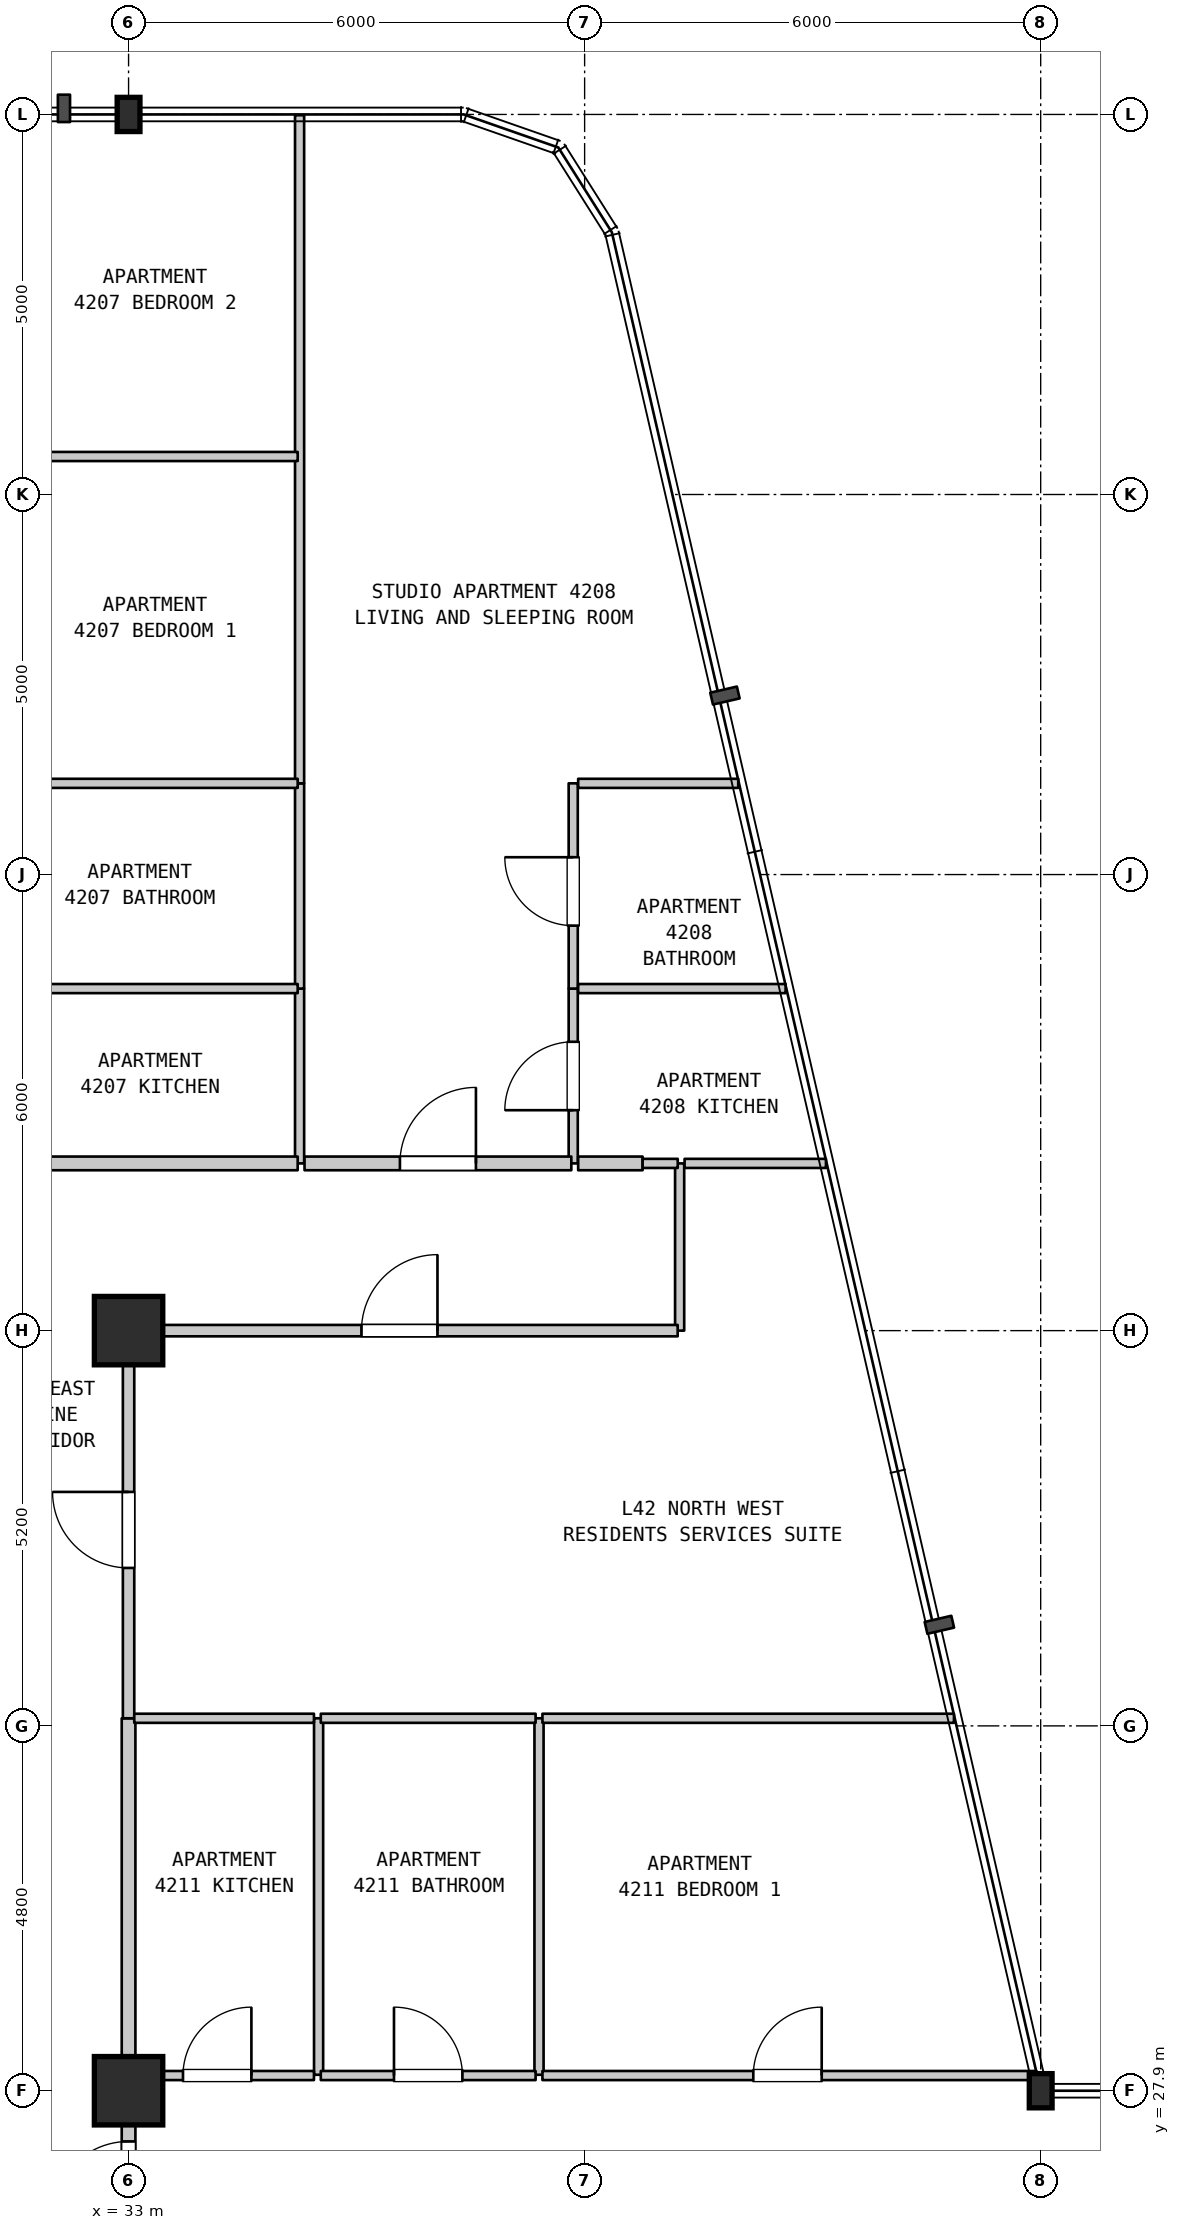
"""IFC4 building model, lengths in metres.
Left out: names, types, materials, properties, quantities, classifications, styles, units other than length and angle.
Written with IfcOpenShell. Run it as: python <this file> out.ifc"""

import sys

from ifc_helpers import new_model, si_unit, direction, frame, frame_2d, origin, origin_2d, place, context, subcontext, project, spatial, rectangle, i_section, extrude, element, fill, save


model = new_model("IFC4")
c1 = context("Model", 3, precision=1e-05, world=origin(), true_north=direction((0.0, 1.0)))
c2 = subcontext(c1, "Body", "Model", "MODEL_VIEW")
j1 = project(units=[si_unit("LENGTHUNIT", "METRE"), si_unit("PLANEANGLEUNIT", "RADIAN")], contexts=[c1])
p1 = place(None, origin())
s1 = spatial("IfcSite", under=j1, at=p1, CompositionType="ELEMENT")
p2 = place(p1, origin())
s2 = spatial("IfcBuilding", under=s1, at=p2, CompositionType="ELEMENT")
p3 = place(p2, frame((0.0, 0.0, 172.8)))
s3 = spatial("IfcBuildingStorey", under=s2, at=p3, CompositionType="ELEMENT", Elevation=172.8)
for number, where, z_axis, x_axis in (
    (1, (33.0, 27.9, 0.0), (0.0, 0.0, 1.0), (1.0, 0.0, 0.0)),
    (2, (33.0, 37.9, 0.0), (0.0, 0.0, 1.0), (1.0, 0.0, 0.0)),
):
    element("IfcColumn", number, at=place(p3, frame(where, z_axis=z_axis, x_axis=x_axis)), inside=s3, PredefinedType="COLUMN", context=c2, shape_type="SweptSolid", body=[
        extrude(rectangle(XDim=0.9, YDim=0.9, at=origin_2d()), origin(), (0.0, 0.0, 1.0), 3.7),
    ])
for number, where, z_axis, x_axis in (
    (3, (33.0, 53.9, 0.0), (0.0, 0.0, 1.0), (1.0, 0.0, 0.0)),
    (4, (45.0, 27.9, 0.0), (0.0, 0.0, 1.0), (1.0, 0.0, 0.0)),
):
    element("IfcColumn", number, at=place(p3, frame(where, z_axis=z_axis, x_axis=x_axis)), inside=s3, PredefinedType="COLUMN", context=c2, shape_type="SweptSolid", body=[
        extrude(i_section(OverallWidth=0.3, OverallDepth=0.45, WebThickness=0.014, FlangeThickness=0.026, FilletRadius=0.027, at=origin_2d()), origin(), (0.0, 0.0, 1.0), 3.7),
    ])
p4 = place(p3, frame((33.0, 25.51, 0.0), z_axis=(0.0, 0.0, 1.0), x_axis=(0.0, 1.0, 0.0)))
e5 = element("IfcWall", 5, at=p4, inside=s3, PredefinedType="STANDARD", context=c2, shape_type="SweptSolid", body=[
    extrude(rectangle(XDim=2.6, YDim=0.18, at=frame_2d((1.3, 0.0))), origin(), (0.0, 0.0, 1.0), 2.99),
])
p5 = place(p4, frame((0.723, 0.0, 0.0)))
e6 = element("IfcOpeningElement", 6, at=p5, cuts=e5, PredefinedType="OPENING", context=c2, shape_type="SweptSolid", body=[
    extrude(rectangle(XDim=1.0, YDim=2.15, at=frame_2d((0.5, 1.075))), frame((0.0, 0.1, 0.0), z_axis=(0.0, -1.0, 0.0), x_axis=(1.0, 0.0, 0.0)), (0.0, 0.0, 1.0), 0.2),
])
p6 = place(p3, frame((33.0, 28.11, 0.0), z_axis=(0.0, 0.0, 1.0), x_axis=(0.0, 1.0, 0.0)))
e7 = element("IfcWall", 7, at=p6, inside=s3, PredefinedType="STANDARD", context=c2, shape_type="SweptSolid", body=[
    extrude(rectangle(XDim=4.69, YDim=0.18, at=frame_2d((2.345, 0.0))), origin(), (0.0, 0.0, 1.0), 2.89),
])
p7 = place(p3, frame((33.0, 32.8, 0.0), z_axis=(0.0, 0.0, 1.0), x_axis=(0.0, 1.0, 0.0)))
e8 = element("IfcWall", 8, at=p7, inside=s3, PredefinedType="STANDARD", context=c2, shape_type="SweptSolid", body=[
    extrude(rectangle(XDim=5.1, YDim=0.15, at=frame_2d((2.55, 0.0))), origin(), (0.0, 0.0, 1.0), 2.89),
])
p8 = place(p7, frame((1.978, 0.0, 0.0)))
e9 = element("IfcOpeningElement", 9, at=p8, cuts=e8, PredefinedType="OPENING", context=c2, shape_type="SweptSolid", body=[
    extrude(rectangle(XDim=1.0, YDim=2.15, at=frame_2d((0.5, 1.075))), frame((0.0, 0.085, 0.0), z_axis=(0.0, -1.0, 0.0), x_axis=(1.0, 0.0, 0.0)), (0.0, 0.0, 1.0), 0.17),
])
p9 = place(p3, frame((35.25, 40.1, 0.0), z_axis=(0.0, 0.0, 1.0), x_axis=(0.0, 1.0, 0.0)))
e10 = element("IfcWall", 10, at=p9, inside=s3, PredefinedType="PARTITIONING", context=c2, shape_type="SweptSolid", body=[
    extrude(rectangle(XDim=2.3, YDim=0.12, at=frame_2d((1.15, 0.0))), origin(), (0.0, 0.0, 1.0), 3.39),
])
p10 = place(p3, frame((35.25, 42.4, 0.0), z_axis=(0.0, 0.0, 1.0), x_axis=(0.0, 1.0, 0.0)))
e11 = element("IfcWall", 11, at=p10, inside=s3, PredefinedType="PARTITIONING", context=c2, shape_type="SweptSolid", body=[
    extrude(rectangle(XDim=2.7, YDim=0.12, at=frame_2d((1.35, 0.0))), origin(), (0.0, 0.0, 1.0), 3.39),
])
p11 = place(p3, frame((35.25, 45.1, 0.0), z_axis=(0.0, 0.0, 1.0), x_axis=(0.0, 1.0, 0.0)))
e12 = element("IfcWall", 12, at=p11, inside=s3, PredefinedType="PARTITIONING", context=c2, shape_type="SweptSolid", body=[
    extrude(rectangle(XDim=8.79, YDim=0.12, at=frame_2d((4.395, 0.0))), origin(), (0.0, 0.0, 1.0), 3.39),
])
for number, where, z_axis, x_axis in (
    (13, (35.5, 28.11, 0.0), (0.0, 0.0, 1.0), (0.0, 1.0, 0.0)),
    (14, (38.4, 28.11, 0.0), (0.0, 0.0, 1.0), (0.0, 1.0, 0.0)),
):
    element("IfcWall", number, at=place(p3, frame(where, z_axis=z_axis, x_axis=x_axis)), inside=s3, PredefinedType="PARTITIONING", context=c2, shape_type="SweptSolid", body=[
        extrude(rectangle(XDim=4.69, YDim=0.12, at=frame_2d((2.345, 0.0))), origin(), (0.0, 0.0, 1.0), 3.39),
    ])
p12 = place(p3, frame((38.85, 40.1, 0.0), z_axis=(0.0, 0.0, 1.0), x_axis=(0.0, 1.0, 0.0)))
e15 = element("IfcWall", 15, at=p12, inside=s3, PredefinedType="PARTITIONING", context=c2, shape_type="SweptSolid", body=[
    extrude(rectangle(XDim=2.3, YDim=0.12, at=frame_2d((1.15, 0.0))), origin(), (0.0, 0.0, 1.0), 3.39),
])
p13 = place(p12, frame((0.7, 0.0, 0.0)))
e16 = element("IfcOpeningElement", 16, at=p13, cuts=e15, PredefinedType="OPENING", context=c2, shape_type="SweptSolid", body=[
    extrude(rectangle(XDim=0.9, YDim=2.15, at=frame_2d((0.45, 1.075))), frame((0.0, 0.07, 0.0), z_axis=(0.0, -1.0, 0.0), x_axis=(1.0, 0.0, 0.0)), (0.0, 0.0, 1.0), 0.14),
])
p14 = place(p3, frame((38.85, 42.4, 0.0), z_axis=(0.0, 0.0, 1.0), x_axis=(0.0, 1.0, 0.0)))
e17 = element("IfcWall", 17, at=p14, inside=s3, PredefinedType="PARTITIONING", context=c2, shape_type="SweptSolid", body=[
    extrude(rectangle(XDim=2.7, YDim=0.12, at=frame_2d((1.35, 0.0))), origin(), (0.0, 0.0, 1.0), 3.39),
])
p15 = place(p14, frame((0.828, 0.0, 0.0)))
e18 = element("IfcOpeningElement", 18, at=p15, cuts=e17, PredefinedType="OPENING", context=c2, shape_type="SweptSolid", body=[
    extrude(rectangle(XDim=0.9, YDim=2.1, at=frame_2d((0.45, 1.05))), frame((0.0, 0.07, 0.0), z_axis=(0.0, -1.0, 0.0), x_axis=(1.0, 0.0, 0.0)), (0.0, 0.0, 1.0), 0.14),
])
p16 = place(p3, frame((40.25, 37.9, 0.0), z_axis=(0.0, 0.0, 1.0), x_axis=(0.0, 1.0, 0.0)))
e19 = element("IfcWall", 19, at=p16, inside=s3, PredefinedType="PARTITIONING", context=c2, shape_type="SweptSolid", body=[
    extrude(rectangle(XDim=2.2, YDim=0.12, at=frame_2d((1.1, 0.0))), origin(), (0.0, 0.0, 1.0), 3.39),
])
p17 = place(p3, frame((33.075, 28.1, 0.0), z_axis=(0.0, 0.0, 1.0), x_axis=(1.0, 0.0, 0.0)))
e20 = element("IfcWall", 20, at=p17, inside=s3, PredefinedType="PARTITIONING", context=c2, shape_type="SweptSolid", body=[
    extrude(rectangle(XDim=2.364, YDim=0.12, at=frame_2d((1.182, 0.0))), origin(), (0.0, 0.0, 1.0), 3.39),
])
p18 = place(p17, frame((0.641, 0.0, 0.0)))
e21 = element("IfcOpeningElement", 21, at=p18, cuts=e20, PredefinedType="OPENING", context=c2, shape_type="SweptSolid", body=[
    extrude(rectangle(XDim=0.9, YDim=2.15, at=frame_2d((0.45, 1.075))), frame((0.0, 0.07, 0.0), z_axis=(0.0, -1.0, 0.0), x_axis=(1.0, 0.0, 0.0)), (0.0, 0.0, 1.0), 0.14),
])
p19 = place(p3, frame((35.529, 28.1, 0.0), z_axis=(0.0, 0.0, 1.0), x_axis=(1.0, 0.0, 0.0)))
e22 = element("IfcWall", 22, at=p19, inside=s3, PredefinedType="PARTITIONING", context=c2, shape_type="SweptSolid", body=[
    extrude(rectangle(XDim=2.826, YDim=0.12, at=frame_2d((1.413, 0.0))), origin(), (0.0, 0.0, 1.0), 3.39),
])
p20 = place(p19, frame((0.963, 0.0, 0.0)))
e23 = element("IfcOpeningElement", 23, at=p20, cuts=e22, PredefinedType="OPENING", context=c2, shape_type="SweptSolid", body=[
    extrude(rectangle(XDim=0.9, YDim=2.1, at=frame_2d((0.45, 1.05))), frame((0.0, 0.07, 0.0), z_axis=(0.0, -1.0, 0.0), x_axis=(1.0, 0.0, 0.0)), (0.0, 0.0, 1.0), 0.14),
])
p21 = place(p3, frame((38.445, 28.1, 0.0), z_axis=(0.0, 0.0, 1.0), x_axis=(1.0, 0.0, 0.0)))
e24 = element("IfcWall", 24, at=p21, inside=s3, PredefinedType="PARTITIONING", context=c2, shape_type="SweptSolid", body=[
    extrude(rectangle(XDim=6.499, YDim=0.12, at=frame_2d((3.25, 0.0))), origin(), (0.0, 0.0, 1.0), 3.39),
])
p22 = place(p21, frame((2.774, 0.0, 0.0)))
e25 = element("IfcOpeningElement", 25, at=p22, cuts=e24, PredefinedType="OPENING", context=c2, shape_type="SweptSolid", body=[
    extrude(rectangle(XDim=0.9, YDim=2.15, at=frame_2d((0.45, 1.075))), frame((0.0, 0.07, 0.0), z_axis=(0.0, -1.0, 0.0), x_axis=(1.0, 0.0, 0.0)), (0.0, 0.0, 1.0), 0.14),
])
p23 = place(p3, frame((33.075, 32.8, 0.0), z_axis=(0.0, 0.0, 1.0), x_axis=(1.0, 0.0, 0.0)))
e26 = element("IfcWall", 26, at=p23, inside=s3, PredefinedType="PARTITIONING", context=c2, shape_type="SweptSolid", body=[
    extrude(rectangle(XDim=2.364, YDim=0.12, at=frame_2d((1.182, 0.0))), origin(), (0.0, 0.0, 1.0), 3.39),
])
p24 = place(p3, frame((35.529, 32.8, 0.0), z_axis=(0.0, 0.0, 1.0), x_axis=(1.0, 0.0, 0.0)))
e27 = element("IfcWall", 27, at=p24, inside=s3, PredefinedType="PARTITIONING", context=c2, shape_type="SweptSolid", body=[
    extrude(rectangle(XDim=2.826, YDim=0.12, at=frame_2d((1.413, 0.0))), origin(), (0.0, 0.0, 1.0), 3.39),
])
p25 = place(p3, frame((38.445, 32.8, 0.0), z_axis=(0.0, 0.0, 1.0), x_axis=(1.0, 0.0, 0.0)))
e28 = element("IfcWall", 28, at=p25, inside=s3, PredefinedType="PARTITIONING", context=c2, shape_type="SweptSolid", body=[
    extrude(rectangle(XDim=5.414, YDim=0.12, at=frame_2d((2.707, 0.0))), origin(), (0.0, 0.0, 1.0), 3.39),
])
p26 = place(p3, frame((33.06, 37.9, 0.0), z_axis=(0.0, 0.0, 1.0), x_axis=(1.0, 0.0, 0.0)))
e29 = element("IfcWall", 29, at=p26, inside=s3, PredefinedType="STANDARD", context=c2, shape_type="SweptSolid", body=[
    extrude(rectangle(XDim=7.164, YDim=0.15, at=frame_2d((3.582, 0.0))), origin(), (0.0, 0.0, 1.0), 3.39),
])
p27 = place(p26, frame((3.004, 0.0, 0.0)))
e30 = element("IfcOpeningElement", 30, at=p27, cuts=e29, PredefinedType="OPENING", context=c2, shape_type="SweptSolid", body=[
    extrude(rectangle(XDim=1.0, YDim=2.15, at=frame_2d((0.5, 1.075))), frame((0.0, 0.085, 0.0), z_axis=(0.0, -1.0, 0.0), x_axis=(1.0, 0.0, 0.0)), (0.0, 0.0, 1.0), 0.17),
])
p28 = place(p3, frame((30.875, 40.1, 0.0), z_axis=(0.0, 0.0, 1.0), x_axis=(1.0, 0.0, 0.0)))
e31 = element("IfcWall", 31, at=p28, inside=s3, PredefinedType="STANDARD", context=c2, shape_type="SweptSolid", body=[
    extrude(rectangle(XDim=4.35, YDim=0.18, at=frame_2d((2.175, 0.0))), origin(), (0.0, 0.0, 1.0), 3.39),
])
p29 = place(p3, frame((35.315, 40.1, 0.0), z_axis=(0.0, 0.0, 1.0), x_axis=(1.0, 0.0, 0.0)))
e32 = element("IfcWall", 32, at=p29, inside=s3, PredefinedType="STANDARD", context=c2, shape_type="SweptSolid", body=[
    extrude(rectangle(XDim=3.51, YDim=0.18, at=frame_2d((1.755, 0.0))), origin(), (0.0, 0.0, 1.0), 3.39),
])
p30 = place(p29, frame((1.255, 0.0, 0.0)))
e33 = element("IfcOpeningElement", 33, at=p30, cuts=e32, PredefinedType="OPENING", context=c2, shape_type="SweptSolid", body=[
    extrude(rectangle(XDim=1.0, YDim=2.15, at=frame_2d((0.5, 1.075))), frame((0.0, 0.1, 0.0), z_axis=(0.0, -1.0, 0.0), x_axis=(1.0, 0.0, 0.0)), (0.0, 0.0, 1.0), 0.2),
])
p31 = place(p3, frame((38.915, 40.1, 0.0), z_axis=(0.0, 0.0, 1.0), x_axis=(1.0, 0.0, 0.0)))
e34 = element("IfcWall", 34, at=p31, inside=s3, PredefinedType="STANDARD", context=c2, shape_type="SweptSolid", body=[
    extrude(rectangle(XDim=0.848, YDim=0.18, at=frame_2d((0.424, 0.0))), origin(), (0.0, 0.0, 1.0), 3.39),
])
p32 = place(p3, frame((39.763, 40.1, 0.0), z_axis=(0.0, 0.0, 1.0), x_axis=(1.0, 0.0, 0.0)))
e35 = element("IfcWall", 35, at=p32, inside=s3, PredefinedType="PARTITIONING", context=c2, shape_type="SweptSolid", body=[
    extrude(rectangle(XDim=0.462, YDim=0.12, at=frame_2d((0.231, 0.0))), origin(), (0.0, 0.0, 1.0), 3.39),
])
p33 = place(p3, frame((40.315, 40.1, 0.0), z_axis=(0.0, 0.0, 1.0), x_axis=(1.0, 0.0, 0.0)))
e36 = element("IfcWall", 36, at=p33, inside=s3, PredefinedType="PARTITIONING", context=c2, shape_type="SweptSolid", body=[
    extrude(rectangle(XDim=1.86, YDim=0.12, at=frame_2d((0.93, 0.0))), origin(), (0.0, 0.0, 1.0), 3.39),
])
p34 = place(p3, frame((30.875, 42.4, 0.0), z_axis=(0.0, 0.0, 1.0), x_axis=(1.0, 0.0, 0.0)))
e37 = element("IfcWall", 37, at=p34, inside=s3, PredefinedType="PARTITIONING", context=c2, shape_type="SweptSolid", body=[
    extrude(rectangle(XDim=4.35, YDim=0.12, at=frame_2d((2.175, 0.0))), origin(), (0.0, 0.0, 1.0), 3.39),
])
p35 = place(p3, frame((38.915, 42.4, 0.0), z_axis=(0.0, 0.0, 1.0), x_axis=(1.0, 0.0, 0.0)))
e38 = element("IfcWall", 38, at=p35, inside=s3, PredefinedType="PARTITIONING", context=c2, shape_type="SweptSolid", body=[
    extrude(rectangle(XDim=2.729, YDim=0.12, at=frame_2d((1.365, 0.0))), origin(), (0.0, 0.0, 1.0), 3.39),
])
p36 = place(p3, frame((30.875, 45.1, 0.0), z_axis=(0.0, 0.0, 1.0), x_axis=(1.0, 0.0, 0.0)))
e39 = element("IfcWall", 39, at=p36, inside=s3, PredefinedType="PARTITIONING", context=c2, shape_type="SweptSolid", body=[
    extrude(rectangle(XDim=4.35, YDim=0.12, at=frame_2d((2.175, 0.0))), origin(), (0.0, 0.0, 1.0), 3.39),
])
p37 = place(p3, frame((38.915, 45.1, 0.0), z_axis=(0.0, 0.0, 1.0), x_axis=(1.0, 0.0, 0.0)))
e40 = element("IfcWall", 40, at=p37, inside=s3, PredefinedType="PARTITIONING", context=c2, shape_type="SweptSolid", body=[
    extrude(rectangle(XDim=2.106, YDim=0.12, at=frame_2d((1.053, 0.0))), origin(), (0.0, 0.0, 1.0), 3.39),
])
p38 = place(p3, frame((30.875, 49.4, 0.0), z_axis=(0.0, 0.0, 1.0), x_axis=(1.0, 0.0, 0.0)))
e41 = element("IfcWall", 41, at=p38, inside=s3, PredefinedType="PARTITIONING", context=c2, shape_type="SweptSolid", body=[
    extrude(rectangle(XDim=4.35, YDim=0.12, at=frame_2d((2.175, 0.0))), origin(), (0.0, 0.0, 1.0), 3.39),
])
p39 = place(p5, origin())
e42 = element("IfcDoor", 42, at=p39, inside=s3, OperationType="SINGLE_SWING_LEFT", PredefinedType="DOOR", context=c2, shape_type="SweptSolid", body=[
    extrude(rectangle(XDim=1.0, YDim=2.15, at=frame_2d((0.5, 1.075))), frame((0.0, 0.025, 0.0), z_axis=(0.0, -1.0, 0.0), x_axis=(1.0, 0.0, 0.0)), (0.0, 0.0, 1.0), 0.05),
])
fill(e6, e42)
p40 = place(p8, origin())
e43 = element("IfcDoor", 43, at=p40, inside=s3, OperationType="SINGLE_SWING_RIGHT", PredefinedType="DOOR", context=c2, shape_type="SweptSolid", body=[
    extrude(rectangle(XDim=1.0, YDim=2.15, at=frame_2d((0.5, 1.075))), frame((0.0, 0.025, 0.0), z_axis=(0.0, -1.0, 0.0), x_axis=(1.0, 0.0, 0.0)), (0.0, 0.0, 1.0), 0.05),
])
fill(e9, e43)
p41 = place(p13, origin())
e44 = element("IfcDoor", 44, at=p41, inside=s3, OperationType="SINGLE_SWING_LEFT", PredefinedType="DOOR", context=c2, shape_type="SweptSolid", body=[
    extrude(rectangle(XDim=0.9, YDim=2.15, at=frame_2d((0.45, 1.075))), frame((0.0, 0.025, 0.0), z_axis=(0.0, -1.0, 0.0), x_axis=(1.0, 0.0, 0.0)), (0.0, 0.0, 1.0), 0.05),
])
fill(e16, e44)
p42 = place(p15, origin())
e45 = element("IfcDoor", 45, at=p42, inside=s3, OperationType="SINGLE_SWING_RIGHT", PredefinedType="DOOR", context=c2, shape_type="SweptSolid", body=[
    extrude(rectangle(XDim=0.9, YDim=2.1, at=frame_2d((0.45, 1.05))), frame((0.0, 0.025, 0.0), z_axis=(0.0, -1.0, 0.0), x_axis=(1.0, 0.0, 0.0)), (0.0, 0.0, 1.0), 0.05),
])
fill(e18, e45)
p43 = place(p18, origin())
e46 = element("IfcDoor", 46, at=p43, inside=s3, OperationType="SINGLE_SWING_RIGHT", PredefinedType="DOOR", context=c2, shape_type="SweptSolid", body=[
    extrude(rectangle(XDim=0.9, YDim=2.15, at=frame_2d((0.45, 1.075))), frame((0.0, 0.025, 0.0), z_axis=(0.0, -1.0, 0.0), x_axis=(1.0, 0.0, 0.0)), (0.0, 0.0, 1.0), 0.05),
])
fill(e21, e46)
p44 = place(p20, origin())
e47 = element("IfcDoor", 47, at=p44, inside=s3, OperationType="SINGLE_SWING_LEFT", PredefinedType="DOOR", context=c2, shape_type="SweptSolid", body=[
    extrude(rectangle(XDim=0.9, YDim=2.1, at=frame_2d((0.45, 1.05))), frame((0.0, 0.025, 0.0), z_axis=(0.0, -1.0, 0.0), x_axis=(1.0, 0.0, 0.0)), (0.0, 0.0, 1.0), 0.05),
])
fill(e23, e47)
p45 = place(p22, origin())
e48 = element("IfcDoor", 48, at=p45, inside=s3, OperationType="SINGLE_SWING_RIGHT", PredefinedType="DOOR", context=c2, shape_type="SweptSolid", body=[
    extrude(rectangle(XDim=0.9, YDim=2.15, at=frame_2d((0.45, 1.075))), frame((0.0, 0.025, 0.0), z_axis=(0.0, -1.0, 0.0), x_axis=(1.0, 0.0, 0.0)), (0.0, 0.0, 1.0), 0.05),
])
fill(e25, e48)
p46 = place(p27, origin())
e49 = element("IfcDoor", 49, at=p46, inside=s3, OperationType="SINGLE_SWING_RIGHT", PredefinedType="DOOR", context=c2, shape_type="SweptSolid", body=[
    extrude(rectangle(XDim=1.0, YDim=2.15, at=frame_2d((0.5, 1.075))), frame((0.0, 0.025, 0.0), z_axis=(0.0, -1.0, 0.0), x_axis=(1.0, 0.0, 0.0)), (0.0, 0.0, 1.0), 0.05),
])
fill(e30, e49)
p47 = place(p30, origin())
e50 = element("IfcDoor", 50, at=p47, inside=s3, OperationType="SINGLE_SWING_RIGHT", PredefinedType="DOOR", context=c2, shape_type="SweptSolid", body=[
    extrude(rectangle(XDim=1.0, YDim=2.15, at=frame_2d((0.5, 1.075))), frame((0.0, 0.025, 0.0), z_axis=(0.0, -1.0, 0.0), x_axis=(1.0, 0.0, 0.0)), (0.0, 0.0, 1.0), 0.05),
])
fill(e33, e50)
save(model, sys.argv[1])
